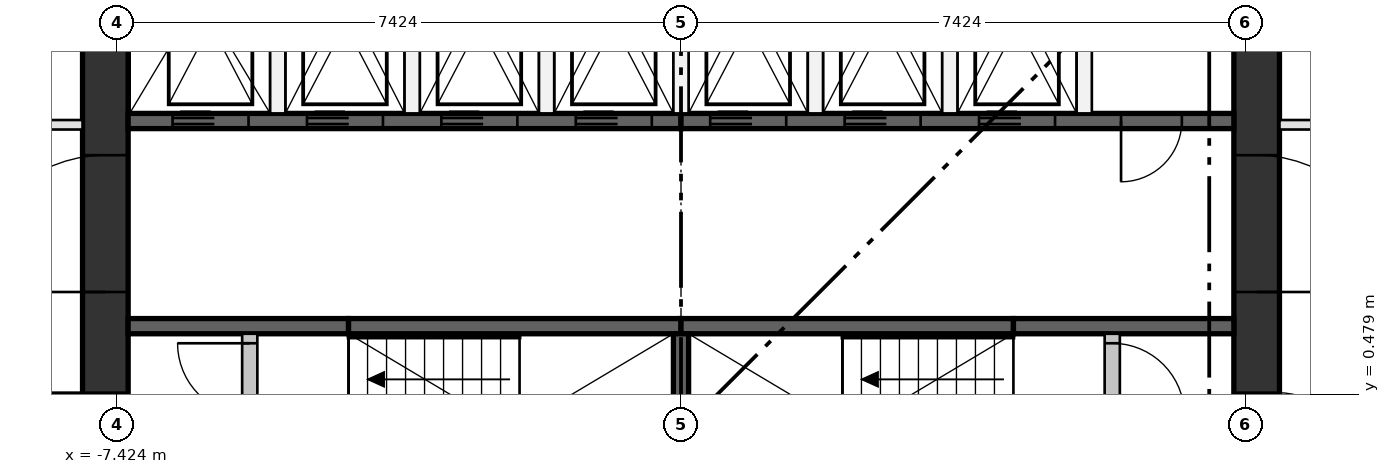
"""IFC4 building model, lengths in metres.
Left out: names, types, materials, properties, quantities, classifications, styles, units other than length and angle.
Written with IfcOpenShell. Run it as: python <this file> out.ifc"""

import sys

from ifc_helpers import new_model, si_unit, direction, frame, frame_2d, origin, place, context, subcontext, project, spatial, rectangle, extrude, element, fill, save


model = new_model("IFC4")
c1 = context("Model", 3, precision=1e-05, world=origin(), true_north=direction((0.0, 1.0)))
c2 = subcontext(c1, "Body", "Model", "MODEL_VIEW")
j1 = project(units=[si_unit("LENGTHUNIT", "METRE"), si_unit("PLANEANGLEUNIT", "RADIAN")], contexts=[c1])
p1 = place(None, origin())
s1 = spatial("IfcSite", under=j1, at=p1, CompositionType="ELEMENT")
p2 = place(p1, origin())
s2 = spatial("IfcBuilding", under=s1, at=p2, CompositionType="ELEMENT")
p3 = place(p2, frame((0.0, 0.0, 151.1)))
s3 = spatial("IfcBuildingStorey", under=s2, at=p3, CompositionType="ELEMENT", Elevation=151.1)
p4 = place(p3, frame((-7.574, -7.274, 0.0), z_axis=(0.0, 0.0, 1.0), x_axis=(0.0, 1.0, 0.0)))
e1 = element("IfcWall", 1, at=p4, inside=s3, PredefinedType="SHEAR", context=c2, shape_type="SweptSolid", body=[
    extrude(rectangle(XDim=14.548, YDim=0.6, at=frame_2d((7.274, 0.0))), origin(), (0.0, 0.0, 1.0), 3.35),
])
p5 = place(p4, frame((6.774, 0.0, 0.0)))
e2 = element("IfcOpeningElement", 2, at=p5, cuts=e1, PredefinedType="OPENING", context=c2, shape_type="SweptSolid", body=[
    extrude(rectangle(XDim=1.0, YDim=2.1, at=frame_2d((0.5, 1.05))), frame((0.0, 0.31, 0.0), z_axis=(0.0, -1.0, 0.0), x_axis=(1.0, 0.0, 0.0)), (0.0, 0.0, 1.0), 0.62),
])
p6 = place(p4, frame((3.649, 0.0, 0.0)))
e3 = element("IfcOpeningElement", 3, at=p6, cuts=e1, PredefinedType="OPENING", context=c2, shape_type="SweptSolid", body=[
    extrude(rectangle(XDim=1.8, YDim=2.1, at=frame_2d((0.9, 1.05))), frame((0.0, 0.31, 0.0), z_axis=(0.0, -1.0, 0.0), x_axis=(1.0, 0.0, 0.0)), (0.0, 0.0, 1.0), 0.62),
])
p7 = place(p4, frame((9.098, 0.0, 0.0)))
e4 = element("IfcOpeningElement", 4, at=p7, cuts=e1, PredefinedType="OPENING", context=c2, shape_type="SweptSolid", body=[
    extrude(rectangle(XDim=1.8, YDim=2.1, at=frame_2d((0.9, 1.05))), frame((0.0, 0.31, 0.0), z_axis=(0.0, -1.0, 0.0), x_axis=(1.0, 0.0, 0.0)), (0.0, 0.0, 1.0), 0.62),
])
p8 = place(p3, frame((7.574, -7.274, 0.0), z_axis=(0.0, 0.0, 1.0), x_axis=(0.0, 1.0, 0.0)))
e5 = element("IfcWall", 5, at=p8, inside=s3, PredefinedType="SHEAR", context=c2, shape_type="SweptSolid", body=[
    extrude(rectangle(XDim=14.548, YDim=0.6, at=frame_2d((7.274, 0.0))), origin(), (0.0, 0.0, 1.0), 3.35),
])
p9 = place(p8, frame((6.774, 0.0, 0.0)))
e6 = element("IfcOpeningElement", 6, at=p9, cuts=e5, PredefinedType="OPENING", context=c2, shape_type="SweptSolid", body=[
    extrude(rectangle(XDim=1.0, YDim=2.1, at=frame_2d((0.5, 1.05))), frame((0.0, 0.31, 0.0), z_axis=(0.0, -1.0, 0.0), x_axis=(1.0, 0.0, 0.0)), (0.0, 0.0, 1.0), 0.62),
])
p10 = place(p8, frame((3.649, 0.0, 0.0)))
e7 = element("IfcOpeningElement", 7, at=p10, cuts=e5, PredefinedType="OPENING", context=c2, shape_type="SweptSolid", body=[
    extrude(rectangle(XDim=1.8, YDim=2.1, at=frame_2d((0.9, 1.05))), frame((0.0, 0.31, 0.0), z_axis=(0.0, -1.0, 0.0), x_axis=(1.0, 0.0, 0.0)), (0.0, 0.0, 1.0), 0.62),
])
p11 = place(p8, frame((9.098, 0.0, 0.0)))
e8 = element("IfcOpeningElement", 8, at=p11, cuts=e5, PredefinedType="OPENING", context=c2, shape_type="SweptSolid", body=[
    extrude(rectangle(XDim=1.8, YDim=2.1, at=frame_2d((0.9, 1.05))), frame((0.0, 0.31, 0.0), z_axis=(0.0, -1.0, 0.0), x_axis=(1.0, 0.0, 0.0)), (0.0, 0.0, 1.0), 0.62),
])
p12 = place(p3, frame((-7.274, 4.074, 0.0), z_axis=(0.0, 0.0, 1.0), x_axis=(1.0, 0.0, 0.0)))
e9 = element("IfcWall", 9, at=p12, inside=s3, PredefinedType="SHEAR", context=c2, shape_type="SweptSolid", body=[
    extrude(rectangle(XDim=7.274, YDim=0.2, at=frame_2d((3.637, 0.0))), origin(), (0.0, 0.0, 1.0), 3.0),
])
p13 = place(p12, frame((0.584, 0.0, 0.0)))
e10 = element("IfcOpeningElement", 10, at=p13, cuts=e9, PredefinedType="OPENING", context=c2, shape_type="SweptSolid", body=[
    extrude(rectangle(XDim=1.0, YDim=2.1, at=frame_2d((0.5, 1.05))), frame((0.0, 0.11, 0.0), z_axis=(0.0, -1.0, 0.0), x_axis=(1.0, 0.0, 0.0)), (0.0, 0.0, 1.0), 0.22),
])
p14 = place(p12, frame((2.353, 0.0, 0.0)))
e11 = element("IfcOpeningElement", 11, at=p14, cuts=e9, PredefinedType="OPENING", context=c2, shape_type="SweptSolid", body=[
    extrude(rectangle(XDim=1.0, YDim=2.1, at=frame_2d((0.5, 1.05))), frame((0.0, 0.11, 0.0), z_axis=(0.0, -1.0, 0.0), x_axis=(1.0, 0.0, 0.0)), (0.0, 0.0, 1.0), 0.22),
])
p15 = place(p12, frame((4.121, 0.0, 0.0)))
e12 = element("IfcOpeningElement", 12, at=p15, cuts=e9, PredefinedType="OPENING", context=c2, shape_type="SweptSolid", body=[
    extrude(rectangle(XDim=1.0, YDim=2.1, at=frame_2d((0.5, 1.05))), frame((0.0, 0.11, 0.0), z_axis=(0.0, -1.0, 0.0), x_axis=(1.0, 0.0, 0.0)), (0.0, 0.0, 1.0), 0.22),
])
p16 = place(p12, frame((5.89, 0.0, 0.0)))
e13 = element("IfcOpeningElement", 13, at=p16, cuts=e9, PredefinedType="OPENING", context=c2, shape_type="SweptSolid", body=[
    extrude(rectangle(XDim=1.0, YDim=2.1, at=frame_2d((0.5, 1.05))), frame((0.0, 0.11, 0.0), z_axis=(0.0, -1.0, 0.0), x_axis=(1.0, 0.0, 0.0)), (0.0, 0.0, 1.0), 0.22),
])
p17 = place(p3, frame((0.0, 4.074, 0.0), z_axis=(0.0, 0.0, 1.0), x_axis=(1.0, 0.0, 0.0)))
e14 = element("IfcWall", 14, at=p17, inside=s3, PredefinedType="SHEAR", context=c2, shape_type="SweptSolid", body=[
    extrude(rectangle(XDim=7.274, YDim=0.2, at=frame_2d((3.637, 0.0))), origin(), (0.0, 0.0, 1.0), 3.0),
])
p18 = place(p17, frame((0.384, 0.0, 0.0)))
e15 = element("IfcOpeningElement", 15, at=p18, cuts=e14, PredefinedType="OPENING", context=c2, shape_type="SweptSolid", body=[
    extrude(rectangle(XDim=1.0, YDim=2.1, at=frame_2d((0.5, 1.05))), frame((0.0, 0.11, 0.0), z_axis=(0.0, -1.0, 0.0), x_axis=(1.0, 0.0, 0.0)), (0.0, 0.0, 1.0), 0.22),
])
p19 = place(p17, frame((2.153, 0.0, 0.0)))
e16 = element("IfcOpeningElement", 16, at=p19, cuts=e14, PredefinedType="OPENING", context=c2, shape_type="SweptSolid", body=[
    extrude(rectangle(XDim=1.0, YDim=2.1, at=frame_2d((0.5, 1.05))), frame((0.0, 0.11, 0.0), z_axis=(0.0, -1.0, 0.0), x_axis=(1.0, 0.0, 0.0)), (0.0, 0.0, 1.0), 0.22),
])
p20 = place(p17, frame((3.921, 0.0, 0.0)))
e17 = element("IfcOpeningElement", 17, at=p20, cuts=e14, PredefinedType="OPENING", context=c2, shape_type="SweptSolid", body=[
    extrude(rectangle(XDim=1.0, YDim=2.1, at=frame_2d((0.5, 1.05))), frame((0.0, 0.11, 0.0), z_axis=(0.0, -1.0, 0.0), x_axis=(1.0, 0.0, 0.0)), (0.0, 0.0, 1.0), 0.22),
])
p21 = place(p17, frame((5.79, 0.0, 0.0)))
e18 = element("IfcOpeningElement", 18, at=p21, cuts=e14, PredefinedType="OPENING", context=c2, shape_type="SweptSolid", body=[
    extrude(rectangle(XDim=0.8, YDim=2.1, at=frame_2d((0.4, 1.05))), frame((0.0, 0.11, 0.0), z_axis=(0.0, -1.0, 0.0), x_axis=(1.0, 0.0, 0.0)), (0.0, 0.0, 1.0), 0.22),
])
p22 = place(p3, frame((-7.274, 1.375, 0.0), z_axis=(0.0, 0.0, 1.0), x_axis=(1.0, 0.0, 0.0)))
e19 = element("IfcWall", 19, at=p22, inside=s3, PredefinedType="SHEAR", context=c2, shape_type="SweptSolid", body=[
    extrude(rectangle(XDim=2.9, YDim=0.2, at=frame_2d((1.45, 0.0))), origin(), (0.0, 0.0, 1.0), 3.0),
])
for number, where, z_axis, x_axis in (
    (20, (-4.374, 1.375, 0.0), (0.0, 0.0, 1.0), (1.0, 0.0, 0.0)),
    (21, (0.0, 1.375, 0.0), (0.0, 0.0, 1.0), (1.0, 0.0, 0.0)),
):
    element("IfcWall", number, at=place(p3, frame(where, z_axis=z_axis, x_axis=x_axis)), inside=s3, PredefinedType="SHEAR", context=c2, shape_type="SweptSolid", body=[
        extrude(rectangle(XDim=4.374, YDim=0.2, at=frame_2d((2.187, 0.0))), origin(), (0.0, 0.0, 1.0), 3.0),
    ])
p23 = place(p3, frame((4.374, 1.375, 0.0), z_axis=(0.0, 0.0, 1.0), x_axis=(1.0, 0.0, 0.0)))
e22 = element("IfcWall", 22, at=p23, inside=s3, PredefinedType="SHEAR", context=c2, shape_type="SweptSolid", body=[
    extrude(rectangle(XDim=2.9, YDim=0.2, at=frame_2d((1.45, 0.0))), origin(), (0.0, 0.0, 1.0), 3.0),
])
p24 = place(p3, frame((0.0, -1.275, 0.0), z_axis=(0.0, 0.0, 1.0), x_axis=(0.0, 1.0, 0.0)))
e23 = element("IfcWall", 23, at=p24, inside=s3, PredefinedType="SHEAR", context=c2, shape_type="SweptSolid", body=[
    extrude(rectangle(XDim=2.55, YDim=0.2, at=frame_2d((1.275, 0.0))), origin(), (0.0, 0.0, 1.0), 3.0),
])
for number, where, z_axis, x_axis in (
    (24, (-5.305, 4.174, 0.0), (0.0, 0.0, 1.0), (0.0, 1.0, 0.0)),
    (25, (-3.537, 4.174, 0.0), (0.0, 0.0, 1.0), (0.0, 1.0, 0.0)),
    (26, (-1.769, 4.174, 0.0), (0.0, 0.0, 1.0), (0.0, 1.0, 0.0)),
    (27, (0.0, 4.174, 0.0), (0.0, 0.0, 1.0), (0.0, 1.0, 0.0)),
    (28, (1.769, 4.174, 0.0), (0.0, 0.0, 1.0), (0.0, 1.0, 0.0)),
    (29, (3.537, 4.174, 0.0), (0.0, 0.0, 1.0), (0.0, 1.0, 0.0)),
    (30, (5.305, 4.174, 0.0), (0.0, 0.0, 1.0), (0.0, 1.0, 0.0)),
):
    element("IfcWall", number, at=place(p3, frame(where, z_axis=z_axis, x_axis=x_axis)), inside=s3, PredefinedType="PARTITIONING", context=c2, shape_type="SweptSolid", body=[
        extrude(rectangle(XDim=3.1, YDim=0.2, at=frame_2d((1.55, 0.0))), origin(), (0.0, 0.0, 1.0), 3.0),
    ])
p25 = place(p3, frame((-5.674, -1.275, 0.0), z_axis=(0.0, 0.0, 1.0), x_axis=(0.0, 1.0, 0.0)))
e31 = element("IfcWall", 31, at=p25, inside=s3, PredefinedType="PARTITIONING", context=c2, shape_type="SweptSolid", body=[
    extrude(rectangle(XDim=2.55, YDim=0.2, at=frame_2d((1.275, 0.0))), origin(), (0.0, 0.0, 1.0), 3.0),
])
p26 = place(p25, frame((0.125, 0.0, 0.0)))
e32 = element("IfcOpeningElement", 32, at=p26, cuts=e31, PredefinedType="OPENING", context=c2, shape_type="SweptSolid", body=[
    extrude(rectangle(XDim=0.95, YDim=2.1, at=frame_2d((0.475, 1.05))), frame((0.0, 0.11, 0.0), z_axis=(0.0, -1.0, 0.0), x_axis=(1.0, 0.0, 0.0)), (0.0, 0.0, 1.0), 0.22),
])
p27 = place(p25, frame((1.475, 0.0, 0.0)))
e33 = element("IfcOpeningElement", 33, at=p27, cuts=e31, PredefinedType="OPENING", context=c2, shape_type="SweptSolid", body=[
    extrude(rectangle(XDim=0.95, YDim=2.1, at=frame_2d((0.475, 1.05))), frame((0.0, 0.11, 0.0), z_axis=(0.0, -1.0, 0.0), x_axis=(1.0, 0.0, 0.0)), (0.0, 0.0, 1.0), 0.22),
])
p28 = place(p3, frame((5.674, -1.275, 0.0), z_axis=(0.0, 0.0, 1.0), x_axis=(0.0, 1.0, 0.0)))
e34 = element("IfcWall", 34, at=p28, inside=s3, PredefinedType="PARTITIONING", context=c2, shape_type="SweptSolid", body=[
    extrude(rectangle(XDim=2.55, YDim=0.2, at=frame_2d((1.275, 0.0))), origin(), (0.0, 0.0, 1.0), 3.0),
])
p29 = place(p28, frame((0.125, 0.0, 0.0)))
e35 = element("IfcOpeningElement", 35, at=p29, cuts=e34, PredefinedType="OPENING", context=c2, shape_type="SweptSolid", body=[
    extrude(rectangle(XDim=0.95, YDim=2.1, at=frame_2d((0.475, 1.05))), frame((0.0, 0.11, 0.0), z_axis=(0.0, -1.0, 0.0), x_axis=(1.0, 0.0, 0.0)), (0.0, 0.0, 1.0), 0.22),
])
p30 = place(p28, frame((1.475, 0.0, 0.0)))
e36 = element("IfcOpeningElement", 36, at=p30, cuts=e34, PredefinedType="OPENING", context=c2, shape_type="SweptSolid", body=[
    extrude(rectangle(XDim=0.95, YDim=2.1, at=frame_2d((0.475, 1.05))), frame((0.0, 0.11, 0.0), z_axis=(0.0, -1.0, 0.0), x_axis=(1.0, 0.0, 0.0)), (0.0, 0.0, 1.0), 0.22),
])
p31 = place(p3, frame((7.874, 4.024, 0.0), z_axis=(0.0, 0.0, 1.0), x_axis=(1.0, 0.0, 0.0)))
e37 = element("IfcWall", 37, at=p31, inside=s3, PredefinedType="PARTITIONING", context=c2, shape_type="SweptSolid", body=[
    extrude(rectangle(XDim=5.036, YDim=0.125, at=frame_2d((2.518, 0.0))), origin(), (0.0, 0.0, 1.0), 3.0),
])
p32 = place(p31, frame((2.0, 0.0, 0.0)))
e38 = element("IfcOpeningElement", 38, at=p32, cuts=e37, PredefinedType="OPENING", context=c2, shape_type="SweptSolid", body=[
    extrude(rectangle(XDim=1.0, YDim=2.1, at=frame_2d((0.5, 1.05))), frame((0.0, 0.073, 0.0), z_axis=(0.0, -1.0, 0.0), x_axis=(1.0, 0.0, 0.0)), (0.0, 0.0, 1.0), 0.145),
])
p33 = place(p3, frame((-11.645, 4.024, 0.0), z_axis=(0.0, 0.0, 1.0), x_axis=(1.0, 0.0, 0.0)))
e39 = element("IfcWall", 39, at=p33, inside=s3, PredefinedType="PARTITIONING", context=c2, shape_type="SweptSolid", body=[
    extrude(rectangle(XDim=3.771, YDim=0.125, at=frame_2d((1.886, 0.0))), origin(), (0.0, 0.0, 1.0), 3.0),
])
p34 = place(p33, frame((1.4, 0.0, 0.0)))
e40 = element("IfcOpeningElement", 40, at=p34, cuts=e39, PredefinedType="OPENING", context=c2, shape_type="SweptSolid", body=[
    extrude(rectangle(XDim=1.0, YDim=2.1, at=frame_2d((0.5, 1.05))), frame((0.0, 0.073, 0.0), z_axis=(0.0, -1.0, 0.0), x_axis=(1.0, 0.0, 0.0)), (0.0, 0.0, 1.0), 0.145),
])
p35 = place(p13, frame((1.0, 0.0, 0.0), z_axis=(0.0, 0.0, 1.0), x_axis=(-1.0, 0.0, 0.0)))
e41 = element("IfcDoor", 41, at=p35, inside=s3, OperationType="DOUBLE_DOOR_SLIDING", PredefinedType="DOOR", context=c2, shape_type="SweptSolid", body=[
    extrude(rectangle(XDim=1.0, YDim=2.1, at=frame_2d((0.5, 1.05))), frame((0.0, 0.025, 0.0), z_axis=(0.0, -1.0, 0.0), x_axis=(1.0, 0.0, 0.0)), (0.0, 0.0, 1.0), 0.05),
])
fill(e10, e41)
p36 = place(p14, frame((1.0, 0.0, 0.0), z_axis=(0.0, 0.0, 1.0), x_axis=(-1.0, 0.0, 0.0)))
e42 = element("IfcDoor", 42, at=p36, inside=s3, OperationType="DOUBLE_DOOR_SLIDING", PredefinedType="DOOR", context=c2, shape_type="SweptSolid", body=[
    extrude(rectangle(XDim=1.0, YDim=2.1, at=frame_2d((0.5, 1.05))), frame((0.0, 0.025, 0.0), z_axis=(0.0, -1.0, 0.0), x_axis=(1.0, 0.0, 0.0)), (0.0, 0.0, 1.0), 0.05),
])
fill(e11, e42)
p37 = place(p15, frame((1.0, 0.0, 0.0), z_axis=(0.0, 0.0, 1.0), x_axis=(-1.0, 0.0, 0.0)))
e43 = element("IfcDoor", 43, at=p37, inside=s3, OperationType="DOUBLE_DOOR_SLIDING", PredefinedType="DOOR", context=c2, shape_type="SweptSolid", body=[
    extrude(rectangle(XDim=1.0, YDim=2.1, at=frame_2d((0.5, 1.05))), frame((0.0, 0.025, 0.0), z_axis=(0.0, -1.0, 0.0), x_axis=(1.0, 0.0, 0.0)), (0.0, 0.0, 1.0), 0.05),
])
fill(e12, e43)
p38 = place(p16, frame((1.0, 0.0, 0.0), z_axis=(0.0, 0.0, 1.0), x_axis=(-1.0, 0.0, 0.0)))
e44 = element("IfcDoor", 44, at=p38, inside=s3, OperationType="DOUBLE_DOOR_SLIDING", PredefinedType="DOOR", context=c2, shape_type="SweptSolid", body=[
    extrude(rectangle(XDim=1.0, YDim=2.1, at=frame_2d((0.5, 1.05))), frame((0.0, 0.025, 0.0), z_axis=(0.0, -1.0, 0.0), x_axis=(1.0, 0.0, 0.0)), (0.0, 0.0, 1.0), 0.05),
])
fill(e13, e44)
p39 = place(p18, frame((1.0, 0.0, 0.0), z_axis=(0.0, 0.0, 1.0), x_axis=(-1.0, 0.0, 0.0)))
e45 = element("IfcDoor", 45, at=p39, inside=s3, OperationType="DOUBLE_DOOR_SLIDING", PredefinedType="DOOR", context=c2, shape_type="SweptSolid", body=[
    extrude(rectangle(XDim=1.0, YDim=2.1, at=frame_2d((0.5, 1.05))), frame((0.0, 0.025, 0.0), z_axis=(0.0, -1.0, 0.0), x_axis=(1.0, 0.0, 0.0)), (0.0, 0.0, 1.0), 0.05),
])
fill(e15, e45)
p40 = place(p19, frame((1.0, 0.0, 0.0), z_axis=(0.0, 0.0, 1.0), x_axis=(-1.0, 0.0, 0.0)))
e46 = element("IfcDoor", 46, at=p40, inside=s3, OperationType="DOUBLE_DOOR_SLIDING", PredefinedType="DOOR", context=c2, shape_type="SweptSolid", body=[
    extrude(rectangle(XDim=1.0, YDim=2.1, at=frame_2d((0.5, 1.05))), frame((0.0, 0.025, 0.0), z_axis=(0.0, -1.0, 0.0), x_axis=(1.0, 0.0, 0.0)), (0.0, 0.0, 1.0), 0.05),
])
fill(e16, e46)
p41 = place(p20, frame((1.0, 0.0, 0.0), z_axis=(0.0, 0.0, 1.0), x_axis=(-1.0, 0.0, 0.0)))
e47 = element("IfcDoor", 47, at=p41, inside=s3, OperationType="DOUBLE_DOOR_SLIDING", PredefinedType="DOOR", context=c2, shape_type="SweptSolid", body=[
    extrude(rectangle(XDim=1.0, YDim=2.1, at=frame_2d((0.5, 1.05))), frame((0.0, 0.025, 0.0), z_axis=(0.0, -1.0, 0.0), x_axis=(1.0, 0.0, 0.0)), (0.0, 0.0, 1.0), 0.05),
])
fill(e17, e47)
p42 = place(p27, origin())
e48 = element("IfcDoor", 48, at=p42, inside=s3, OperationType="SINGLE_SWING_RIGHT", PredefinedType="DOOR", context=c2, shape_type="SweptSolid", body=[
    extrude(rectangle(XDim=0.95, YDim=2.1, at=frame_2d((0.475, 1.05))), frame((0.0, 0.025, 0.0), z_axis=(0.0, -1.0, 0.0), x_axis=(1.0, 0.0, 0.0)), (0.0, 0.0, 1.0), 0.05),
])
fill(e33, e48)
p43 = place(p30, frame((0.95, 0.0, 0.0), z_axis=(0.0, 0.0, 1.0), x_axis=(-1.0, 0.0, 0.0)))
e49 = element("IfcDoor", 49, at=p43, inside=s3, OperationType="SINGLE_SWING_LEFT", PredefinedType="DOOR", context=c2, shape_type="SweptSolid", body=[
    extrude(rectangle(XDim=0.95, YDim=2.1, at=frame_2d((0.475, 1.05))), frame((0.0, 0.025, 0.0), z_axis=(0.0, -1.0, 0.0), x_axis=(1.0, 0.0, 0.0)), (0.0, 0.0, 1.0), 0.05),
])
fill(e36, e49)
p44 = place(p21, frame((0.8, 0.0, 0.0), z_axis=(0.0, 0.0, 1.0), x_axis=(-1.0, 0.0, 0.0)))
e50 = element("IfcDoor", 50, at=p44, inside=s3, OperationType="SINGLE_SWING_LEFT", PredefinedType="DOOR", context=c2, shape_type="SweptSolid", body=[
    extrude(rectangle(XDim=0.8, YDim=2.1, at=frame_2d((0.4, 1.05))), frame((0.0, 0.025, 0.0), z_axis=(0.0, -1.0, 0.0), x_axis=(1.0, 0.0, 0.0)), (0.0, 0.0, 1.0), 0.05),
])
fill(e18, e50)
p45 = place(p5, origin())
e51 = element("IfcDoor", 51, at=p45, inside=s3, OperationType="SINGLE_SWING_RIGHT", PredefinedType="DOOR", context=c2, shape_type="SweptSolid", body=[
    extrude(rectangle(XDim=1.0, YDim=2.1, at=frame_2d((0.5, 1.05))), frame((0.0, 0.3, 0.0), z_axis=(0.0, -1.0, 0.0), x_axis=(1.0, 0.0, 0.0)), (0.0, 0.0, 1.0), 0.05),
])
fill(e2, e51)
p46 = place(p7, origin())
e52 = element("IfcDoor", 52, at=p46, inside=s3, OperationType="DOUBLE_DOOR_SINGLE_SWING", PredefinedType="DOOR", context=c2, shape_type="SweptSolid", body=[
    extrude(rectangle(XDim=1.8, YDim=2.1, at=frame_2d((0.9, 1.05))), frame((0.0, 0.025, 0.0), z_axis=(0.0, -1.0, 0.0), x_axis=(1.0, 0.0, 0.0)), (0.0, 0.0, 1.0), 0.05),
])
fill(e4, e52)
p47 = place(p9, frame((1.0, 0.0, 0.0), z_axis=(0.0, 0.0, 1.0), x_axis=(-1.0, 0.0, 0.0)))
e53 = element("IfcDoor", 53, at=p47, inside=s3, OperationType="SINGLE_SWING_LEFT", PredefinedType="DOOR", context=c2, shape_type="SweptSolid", body=[
    extrude(rectangle(XDim=1.0, YDim=2.1, at=frame_2d((0.5, 1.05))), frame((0.0, 0.3, 0.0), z_axis=(0.0, -1.0, 0.0), x_axis=(1.0, 0.0, 0.0)), (0.0, 0.0, 1.0), 0.05),
])
fill(e6, e53)
p48 = place(p11, frame((1.8, 0.0, 0.0), z_axis=(0.0, 0.0, 1.0), x_axis=(-1.0, 0.0, 0.0)))
e54 = element("IfcDoor", 54, at=p48, inside=s3, OperationType="DOUBLE_DOOR_SINGLE_SWING", PredefinedType="DOOR", context=c2, shape_type="SweptSolid", body=[
    extrude(rectangle(XDim=1.8, YDim=2.1, at=frame_2d((0.9, 1.05))), frame((0.0, 0.025, 0.0), z_axis=(0.0, -1.0, 0.0), x_axis=(1.0, 0.0, 0.0)), (0.0, 0.0, 1.0), 0.05),
])
fill(e8, e54)
save(model, sys.argv[1])
